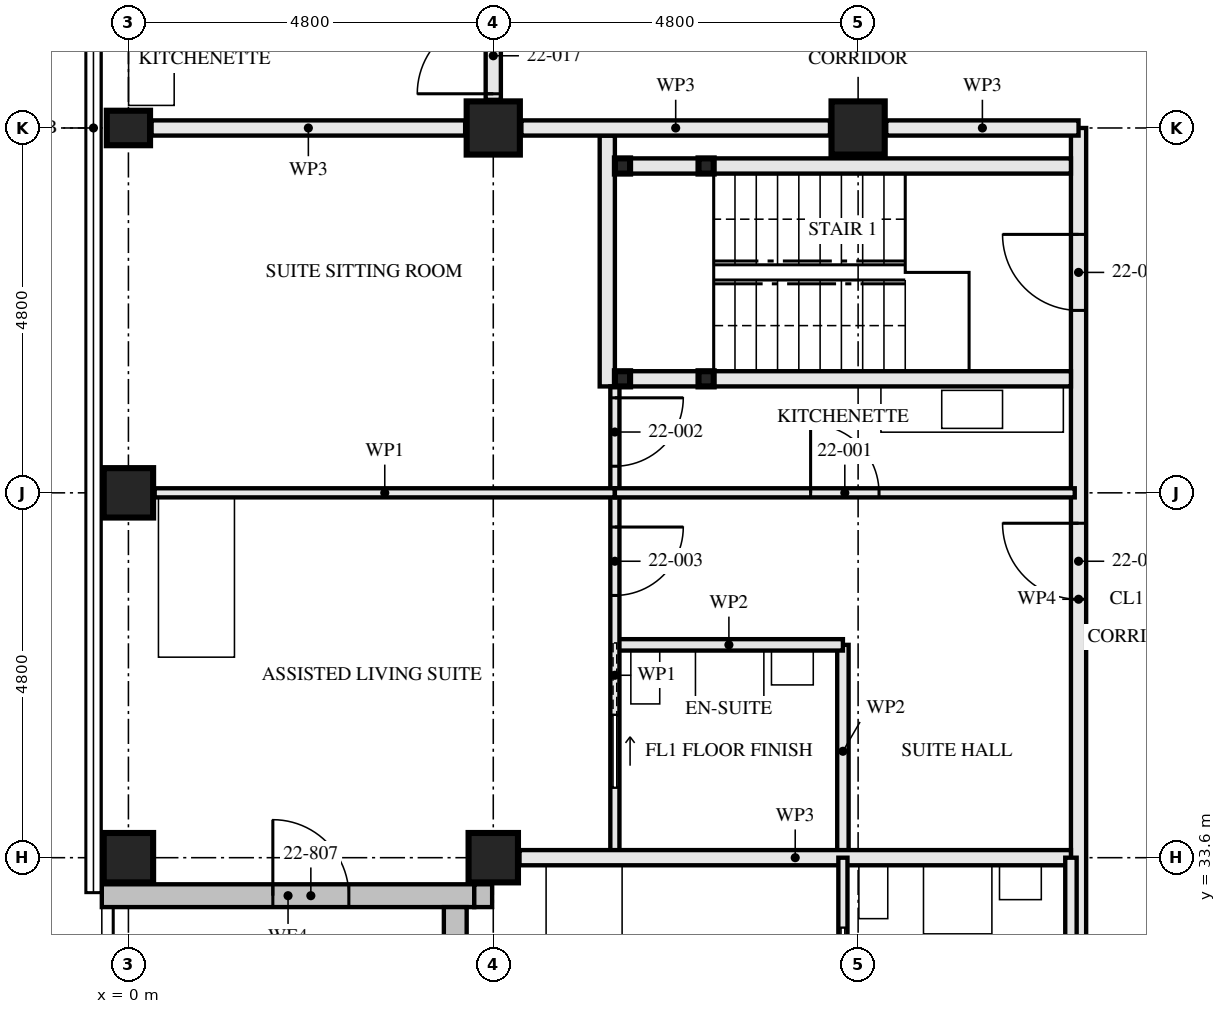
"""IFC4 building model, lengths in metres.
Left out: names, types, materials, properties, quantities, classifications, styles, units other than length and angle.
Written with IfcOpenShell. Run it as: python <this file> out.ifc"""

import sys

from ifc_helpers import new_model, si_unit, direction, frame, frame_2d, origin, origin_2d, place, context, subcontext, project, spatial, rectangle, hollow_rectangle, i_section, extrude, element, fill, save


model = new_model("IFC4")
c1 = context("Model", 3, precision=1e-05, world=origin(), true_north=direction((0.0, 1.0)))
c2 = subcontext(c1, "Body", "Model", "MODEL_VIEW")
j1 = project(units=[si_unit("LENGTHUNIT", "METRE"), si_unit("PLANEANGLEUNIT", "RADIAN")], contexts=[c1])
p1 = place(None, origin())
s1 = spatial("IfcSite", under=j1, at=p1, CompositionType="ELEMENT")
p2 = place(p1, origin())
s2 = spatial("IfcBuilding", under=s1, at=p2, CompositionType="ELEMENT")
p3 = place(p2, frame((0.0, 0.0, 84.0)))
s3 = spatial("IfcBuildingStorey", under=s2, at=p3, CompositionType="ELEMENT", Elevation=84.0)
for number, where, z_axis, x_axis in (
    (1, (0.0, 33.6, 0.0), (0.0, 0.0, 1.0), (0.0, 1.0, 0.0)),
    (2, (0.0, 38.4, 0.0), (0.0, 0.0, 1.0), (1.0, 0.0, 0.0)),
):
    element("IfcColumn", number, at=place(p3, frame(where, z_axis=z_axis, x_axis=x_axis)), inside=s3, PredefinedType="COLUMN", context=c2, shape_type="SweptSolid", body=[
        extrude(hollow_rectangle(XDim=0.65, YDim=0.65, WallThickness=0.08, at=origin_2d()), origin(), (0.0, 0.0, 1.0), 3.5),
    ])
p4 = place(p3, frame((0.0, 43.2, 0.0), z_axis=(0.0, 0.0, 1.0), x_axis=(0.0, 1.0, 0.0)))
e3 = element("IfcColumn", 3, at=p4, inside=s3, PredefinedType="COLUMN", context=c2, shape_type="SweptSolid", body=[
    extrude(i_section(OverallWidth=0.454, OverallDepth=0.569, WebThickness=0.078, FlangeThickness=0.125, FilletRadius=0.015, at=origin_2d()), origin(), (0.0, 0.0, 1.0), 3.5),
])
p5 = place(p3, frame((4.8, 33.6, 0.0), z_axis=(0.0, 0.0, 1.0), x_axis=(0.0, 1.0, 0.0)))
e4 = element("IfcColumn", 4, at=p5, inside=s3, PredefinedType="COLUMN", context=c2, shape_type="SweptSolid", body=[
    extrude(hollow_rectangle(XDim=0.65, YDim=0.65, WallThickness=0.08, at=origin_2d()), origin(), (0.0, 0.0, 1.0), 3.5),
])
for number, where, z_axis, x_axis in (
    (5, (4.8, 43.2, 0.0), (0.0, 0.0, 1.0), (0.0, 1.0, 0.0)),
    (6, (9.6, 43.2, 0.0), (0.0, 0.0, 1.0), (0.0, 1.0, 0.0)),
):
    element("IfcColumn", number, at=place(p3, frame(where, z_axis=z_axis, x_axis=x_axis)), inside=s3, PredefinedType="COLUMN", context=c2, shape_type="SweptSolid", body=[
        extrude(hollow_rectangle(XDim=0.7, YDim=0.7, WallThickness=0.06, at=origin_2d()), origin(), (0.0, 0.0, 1.0), 3.5),
    ])
for number, where, z_axis, x_axis in (
    (7, (6.5, 42.7, 0.0), (0.0, 0.0, 1.0), (1.0, 0.0, 0.0)),
    (8, (6.5, 39.9, 0.0), (0.0, 0.0, 1.0), (1.0, 0.0, 0.0)),
    (9, (7.6, 42.7, 0.0), (0.0, 0.0, 1.0), (1.0, 0.0, 0.0)),
    (10, (7.6, 39.9, 0.0), (0.0, 0.0, 1.0), (1.0, 0.0, 0.0)),
):
    element("IfcColumn", number, at=place(p3, frame(where, z_axis=z_axis, x_axis=x_axis)), inside=s3, PredefinedType="COLUMN", context=c2, shape_type="SweptSolid", body=[
        extrude(hollow_rectangle(XDim=0.2, YDim=0.2, WallThickness=0.008, at=origin_2d()), origin(), (0.0, 0.0, 1.0), 3.33),
    ])
p6 = place(p3, frame((-0.35, 33.1, 0.0), z_axis=(0.0, 0.0, 1.0), x_axis=(1.0, 0.0, 0.0)))
e11 = element("IfcWall", 11, at=p6, inside=s3, PredefinedType="SOLIDWALL", context=c2, shape_type="SweptSolid", body=[
    extrude(rectangle(XDim=4.9, YDim=0.3, at=frame_2d((2.45, 0.0))), origin(), (0.0, 0.0, 1.0), 3.5),
])
p7 = place(p6, frame((2.25, 0.0, 0.0)))
e12 = element("IfcOpeningElement", 12, at=p7, cuts=e11, PredefinedType="OPENING", context=c2, shape_type="SweptSolid", body=[
    extrude(rectangle(XDim=1.0, YDim=2.4, at=frame_2d((0.5, 1.2))), frame((0.0, 0.161, 0.0), z_axis=(0.0, -1.0, 0.0), x_axis=(1.0, 0.0, 0.0)), (0.0, 0.0, 1.0), 0.321),
])
p8 = place(p3, frame((4.3, 32.95, 0.0), z_axis=(0.0, 0.0, 1.0), x_axis=(0.0, -1.0, 0.0)))
e13 = element("IfcWall", 13, at=p8, inside=s3, PredefinedType="SOLIDWALL", context=c2, shape_type="SweptSolid", body=[
    extrude(rectangle(XDim=4.8, YDim=0.3, at=frame_2d((2.4, 0.0))), origin(), (0.0, 0.0, 1.0), 3.5),
])
p9 = place(p8, frame((1.25, 0.0, 0.0)))
e14 = element("IfcOpeningElement", 14, at=p9, cuts=e13, PredefinedType="OPENING", context=c2, shape_type="SweptSolid", body=[
    extrude(rectangle(XDim=1.0, YDim=2.4, at=frame_2d((0.5, 1.2))), frame((0.0, 0.161, 0.0), z_axis=(0.0, -1.0, 0.0), x_axis=(1.0, 0.0, 0.0)), (0.0, 0.0, 1.0), 0.321),
])
p10 = place(p3, frame((4.55, 33.1, 2.39), z_axis=(0.0, 0.0, 1.0), x_axis=(1.0, 0.0, 0.0)))
e15 = element("IfcWall", 15, at=p10, inside=s3, PredefinedType="SOLIDWALL", context=c2, shape_type="SweptSolid", body=[
    extrude(rectangle(XDim=0.235, YDim=0.3, at=frame_2d((0.117, 0.0))), origin(), (0.0, 0.0, 1.0), 0.88),
])
p11 = place(p3, frame((6.6, 42.7, 0.0), z_axis=(0.0, 0.0, 1.0), x_axis=(1.0, 0.0, 0.0)))
e16 = element("IfcWall", 16, at=p11, inside=s3, PredefinedType="SOLIDWALL", context=c2, shape_type="SweptSolid", body=[
    extrude(rectangle(XDim=0.9, YDim=0.2, at=frame_2d((0.45, 0.0))), origin(), (0.0, 0.0, 1.0), 2.99),
])
p12 = place(p3, frame((7.7, 42.7, 0.0), z_axis=(0.0, 0.0, 1.0), x_axis=(1.0, 0.0, 0.0)))
e17 = element("IfcWall", 17, at=p12, inside=s3, PredefinedType="SOLIDWALL", context=c2, shape_type="SweptSolid", body=[
    extrude(rectangle(XDim=4.7, YDim=0.2, at=frame_2d((2.35, 0.0))), origin(), (0.0, 0.0, 1.0), 2.99),
])
p13 = place(p3, frame((6.6, 39.9, 0.0), z_axis=(0.0, 0.0, 1.0), x_axis=(1.0, 0.0, 0.0)))
e18 = element("IfcWall", 18, at=p13, inside=s3, PredefinedType="SOLIDWALL", context=c2, shape_type="SweptSolid", body=[
    extrude(rectangle(XDim=0.9, YDim=0.2, at=frame_2d((0.45, 0.0))), origin(), (0.0, 0.0, 1.0), 2.99),
])
p14 = place(p3, frame((7.7, 39.9, 0.0), z_axis=(0.0, 0.0, 1.0), x_axis=(1.0, 0.0, 0.0)))
e19 = element("IfcWall", 19, at=p14, inside=s3, PredefinedType="SOLIDWALL", context=c2, shape_type="SweptSolid", body=[
    extrude(rectangle(XDim=4.7, YDim=0.2, at=frame_2d((2.35, 0.0))), origin(), (0.0, 0.0, 1.0), 2.99),
])
p15 = place(p3, frame((6.3, 43.1, 0.0), z_axis=(0.0, 0.0, 1.0), x_axis=(0.0, -1.0, 0.0)))
e20 = element("IfcWall", 20, at=p15, inside=s3, PredefinedType="SOLIDWALL", context=c2, shape_type="SweptSolid", body=[
    extrude(rectangle(XDim=3.3, YDim=0.2, at=frame_2d((1.65, 0.0))), origin(), (0.0, 0.0, 1.0), 3.33),
])
p16 = place(p3, frame((6.4, 36.4, 0.0), z_axis=(0.0, 0.0, 1.0), x_axis=(1.0, 0.0, 0.0)))
e21 = element("IfcWall", 21, at=p16, inside=s3, PredefinedType="PARTITIONING", context=c2, shape_type="SweptSolid", body=[
    extrude(rectangle(XDim=3.0, YDim=0.15, at=frame_2d((1.5, 0.0))), origin(), (0.0, 0.0, 1.0), 3.33),
])
p17 = place(p3, frame((9.4, 36.4, 0.0), z_axis=(0.0, 0.0, 1.0), x_axis=(0.0, -1.0, 0.0)))
e22 = element("IfcWall", 22, at=p17, inside=s3, PredefinedType="PARTITIONING", context=c2, shape_type="SweptSolid", body=[
    extrude(rectangle(XDim=2.8, YDim=0.15, at=frame_2d((1.4, 0.0))), origin(), (0.0, 0.0, 1.0), 3.33),
])
p18 = place(p3, frame((6.4, 38.4, 0.0), z_axis=(0.0, 0.0, 1.0), x_axis=(1.0, 0.0, 0.0)))
e23 = element("IfcWall", 23, at=p18, inside=s3, PredefinedType="PARTITIONING", context=c2, shape_type="SweptSolid", body=[
    extrude(rectangle(XDim=6.05, YDim=0.12, at=frame_2d((3.025, 0.0))), origin(), (0.0, 0.0, 1.0), 2.55),
])
p19 = place(p18, frame((2.575, 0.0, 0.0)))
e24 = element("IfcOpeningElement", 24, at=p19, cuts=e23, PredefinedType="OPENING", context=c2, shape_type="SweptSolid", body=[
    extrude(rectangle(XDim=0.9, YDim=2.1, at=frame_2d((0.45, 1.05))), frame((0.0, 0.071, 0.0), z_axis=(0.0, -1.0, 0.0), x_axis=(1.0, 0.0, 0.0)), (0.0, 0.0, 1.0), 0.141),
])
p20 = place(p3, frame((6.4, 39.8, 0.0), z_axis=(0.0, 0.0, 1.0), x_axis=(0.0, -1.0, 0.0)))
e25 = element("IfcWall", 25, at=p20, inside=s3, PredefinedType="PARTITIONING", context=c2, shape_type="SweptSolid", body=[
    extrude(rectangle(XDim=1.4, YDim=0.12, at=frame_2d((0.7, 0.0))), origin(), (0.0, 0.0, 1.0), 3.33),
])
p21 = place(p20, frame((0.15, 0.0, 0.0)))
e26 = element("IfcOpeningElement", 26, at=p21, cuts=e25, PredefinedType="OPENING", context=c2, shape_type="SweptSolid", body=[
    extrude(rectangle(XDim=0.9, YDim=2.1, at=frame_2d((0.45, 1.05))), frame((0.0, 0.071, 0.0), z_axis=(0.0, -1.0, 0.0), x_axis=(1.0, 0.0, 0.0)), (0.0, 0.0, 1.0), 0.141),
])
p22 = place(p3, frame((6.4, 38.4, 0.0), z_axis=(0.0, 0.0, 1.0), x_axis=(0.0, -1.0, 0.0)))
e27 = element("IfcWall", 27, at=p22, inside=s3, PredefinedType="PARTITIONING", context=c2, shape_type="SweptSolid", body=[
    extrude(rectangle(XDim=4.8, YDim=0.12, at=frame_2d((2.4, 0.0))), origin(), (0.0, 0.0, 1.0), 3.33),
])
p23 = place(p22, frame((0.45, 0.0, 0.0)))
e28 = element("IfcOpeningElement", 28, at=p23, cuts=e27, PredefinedType="OPENING", context=c2, shape_type="SweptSolid", body=[
    extrude(rectangle(XDim=0.9, YDim=2.1, at=frame_2d((0.45, 1.05))), frame((0.0, 0.071, 0.0), z_axis=(0.0, -1.0, 0.0), x_axis=(1.0, 0.0, 0.0)), (0.0, 0.0, 1.0), 0.141),
])
p24 = place(p22, frame((2.925, 0.0, 0.0)))
e29 = element("IfcOpeningElement", 29, at=p24, cuts=e27, PredefinedType="OPENING", context=c2, shape_type="SweptSolid", body=[
    extrude(rectangle(XDim=0.95, YDim=2.1, at=frame_2d((0.475, 1.05))), frame((0.0, 0.071, 0.0), z_axis=(0.0, -1.0, 0.0), x_axis=(1.0, 0.0, 0.0)), (0.0, 0.0, 1.0), 0.141),
])
p25 = place(p3, frame((0.345, 38.4, 0.0), z_axis=(0.0, 0.0, 1.0), x_axis=(1.0, 0.0, 0.0)))
e30 = element("IfcWall", 30, at=p25, inside=s3, PredefinedType="PARTITIONING", context=c2, shape_type="SweptSolid", body=[
    extrude(rectangle(XDim=6.055, YDim=0.12, at=frame_2d((3.027, 0.0))), origin(), (0.0, 0.0, 1.0), 2.55),
])
p26 = place(p3, frame((5.145, 33.6, 0.0), z_axis=(0.0, 0.0, 1.0), x_axis=(1.0, 0.0, 0.0)))
e31 = element("IfcWall", 31, at=p26, inside=s3, PredefinedType="PARTITIONING", context=c2, shape_type="SweptSolid", body=[
    extrude(rectangle(XDim=7.255, YDim=0.2, at=frame_2d((3.627, 0.0))), origin(), (0.0, 0.0, 1.0), 2.55),
])
p27 = place(p3, frame((12.4, 33.6, 0.0), z_axis=(0.0, 0.0, 1.0), x_axis=(0.0, -1.0, 0.0)))
e32 = element("IfcWall", 32, at=p27, inside=s3, PredefinedType="PARTITIONING", context=c2, shape_type="SweptSolid", body=[
    extrude(rectangle(XDim=2.8, YDim=0.15, at=frame_2d((1.4, 0.0))), origin(), (0.0, 0.0, 1.0), 3.33),
])
p28 = place(p3, frame((9.4, 33.6, 0.0), z_axis=(0.0, 0.0, 1.0), x_axis=(0.0, -1.0, 0.0)))
e33 = element("IfcWall", 33, at=p28, inside=s3, PredefinedType="PARTITIONING", context=c2, shape_type="SweptSolid", body=[
    extrude(rectangle(XDim=4.48, YDim=0.12, at=frame_2d((2.24, 0.0))), origin(), (0.0, 0.0, 1.0), 3.33),
])
p29 = place(p28, frame((2.975, 0.0, 0.0)))
e34 = element("IfcOpeningElement", 34, at=p29, cuts=e33, PredefinedType="OPENING", context=c2, shape_type="SweptSolid", body=[
    extrude(rectangle(XDim=0.9, YDim=2.1, at=frame_2d((0.45, 1.05))), frame((0.0, 0.071, 0.0), z_axis=(0.0, -1.0, 0.0), x_axis=(1.0, 0.0, 0.0)), (0.0, 0.0, 1.0), 0.141),
])
p30 = place(p28, frame((0.925, 0.0, 0.0)))
e35 = element("IfcOpeningElement", 35, at=p30, cuts=e33, PredefinedType="OPENING", context=c2, shape_type="SweptSolid", body=[
    extrude(rectangle(XDim=0.95, YDim=2.1, at=frame_2d((0.475, 1.05))), frame((0.0, 0.071, 0.0), z_axis=(0.0, -1.0, 0.0), x_axis=(1.0, 0.0, 0.0)), (0.0, 0.0, 1.0), 0.141),
])
p31 = place(p3, frame((12.5, 43.2, 0.0), z_axis=(0.0, 0.0, 1.0), x_axis=(0.0, -1.0, 0.0)))
e36 = element("IfcWall", 36, at=p31, inside=s3, PredefinedType="PARTITIONING", context=c2, shape_type="SweptSolid", body=[
    extrude(rectangle(XDim=12.4, YDim=0.2, at=frame_2d((6.2, 0.0))), origin(), (0.0, 0.0, 1.0), 2.55),
])
p32 = place(p31, frame((1.4, 0.0, 0.0)))
e37 = element("IfcOpeningElement", 37, at=p32, cuts=e36, PredefinedType="OPENING", context=c2, shape_type="SweptSolid", body=[
    extrude(rectangle(XDim=1.0, YDim=2.1, at=frame_2d((0.5, 1.05))), frame((0.0, 0.111, 0.0), z_axis=(0.0, -1.0, 0.0), x_axis=(1.0, 0.0, 0.0)), (0.0, 0.0, 1.0), 0.221),
])
p33 = place(p31, frame((5.2, 0.0, 0.0)))
e38 = element("IfcOpeningElement", 38, at=p33, cuts=e36, PredefinedType="OPENING", context=c2, shape_type="SweptSolid", body=[
    extrude(rectangle(XDim=1.0, YDim=2.1, at=frame_2d((0.5, 1.05))), frame((0.0, 0.111, 0.0), z_axis=(0.0, -1.0, 0.0), x_axis=(1.0, 0.0, 0.0)), (0.0, 0.0, 1.0), 0.221),
])
p34 = place(p3, frame((4.8, 45.2, 0.0), z_axis=(0.0, 0.0, 1.0), x_axis=(0.0, -1.0, 0.0)))
e39 = element("IfcWall", 39, at=p34, inside=s3, PredefinedType="PARTITIONING", context=c2, shape_type="SweptSolid", body=[
    extrude(rectangle(XDim=1.63, YDim=0.2, at=frame_2d((0.815, 0.0))), origin(), (0.0, 0.0, 1.0), 3.33),
])
p35 = place(p34, frame((0.55, 0.0, 0.0)))
e40 = element("IfcOpeningElement", 40, at=p35, cuts=e39, PredefinedType="OPENING", context=c2, shape_type="SweptSolid", body=[
    extrude(rectangle(XDim=1.0, YDim=2.1, at=frame_2d((0.5, 1.05))), frame((0.0, 0.111, 0.0), z_axis=(0.0, -1.0, 0.0), x_axis=(1.0, 0.0, 0.0)), (0.0, 0.0, 1.0), 0.221),
])
p36 = place(p3, frame((12.5, 43.2, 0.0), z_axis=(0.0, 0.0, 1.0), x_axis=(-1.0, 0.0, 0.0)))
e41 = element("IfcWall", 41, at=p36, inside=s3, PredefinedType="PARTITIONING", context=c2, shape_type="SweptSolid", body=[
    extrude(rectangle(XDim=2.53, YDim=0.2, at=frame_2d((1.265, 0.0))), origin(), (0.0, 0.0, 1.0), 2.32),
])
p37 = place(p3, frame((9.23, 43.2, 0.0), z_axis=(0.0, 0.0, 1.0), x_axis=(-1.0, 0.0, 0.0)))
e42 = element("IfcWall", 42, at=p37, inside=s3, PredefinedType="PARTITIONING", context=c2, shape_type="SweptSolid", body=[
    extrude(rectangle(XDim=4.06, YDim=0.2, at=frame_2d((2.03, 0.0))), origin(), (0.0, 0.0, 1.0), 2.32),
])
p38 = place(p3, frame((4.43, 43.2, 0.0), z_axis=(0.0, 0.0, 1.0), x_axis=(-1.0, 0.0, 0.0)))
e43 = element("IfcWall", 43, at=p38, inside=s3, PredefinedType="PARTITIONING", context=c2, shape_type="SweptSolid", body=[
    extrude(rectangle(XDim=4.125, YDim=0.2, at=frame_2d((2.063, 0.0))), origin(), (0.0, 0.0, 1.0), 2.32),
])
p39 = place(p7, origin())
e44 = element("IfcDoor", 44, at=p39, inside=s3, OperationType="SINGLE_SWING_LEFT", PredefinedType="DOOR", context=c2, shape_type="SweptSolid", body=[
    extrude(rectangle(XDim=1.0, YDim=2.4, at=frame_2d((0.5, 1.2))), frame((0.0, 0.035, 0.0), z_axis=(0.0, -1.0, 0.0), x_axis=(1.0, 0.0, 0.0)), (0.0, 0.0, 1.0), 0.07),
])
fill(e12, e44)
p40 = place(p19, origin())
e45 = element("IfcDoor", 45, at=p40, inside=s3, OperationType="SINGLE_SWING_RIGHT", PredefinedType="DOOR", context=c2, shape_type="SweptSolid", body=[
    extrude(rectangle(XDim=0.9, YDim=2.1, at=frame_2d((0.45, 1.05))), frame((0.0, 0.022, 0.0), z_axis=(0.0, -1.0, 0.0), x_axis=(1.0, 0.0, 0.0)), (0.0, 0.0, 1.0), 0.044),
])
fill(e24, e45)
p41 = place(p21, origin())
e46 = element("IfcDoor", 46, at=p41, inside=s3, OperationType="SINGLE_SWING_RIGHT", PredefinedType="DOOR", context=c2, shape_type="SweptSolid", body=[
    extrude(rectangle(XDim=0.9, YDim=2.1, at=frame_2d((0.45, 1.05))), frame((0.0, 0.022, 0.0), z_axis=(0.0, -1.0, 0.0), x_axis=(1.0, 0.0, 0.0)), (0.0, 0.0, 1.0), 0.044),
])
fill(e26, e46)
p42 = place(p23, origin())
e47 = element("IfcDoor", 47, at=p42, inside=s3, OperationType="SINGLE_SWING_RIGHT", PredefinedType="DOOR", context=c2, shape_type="SweptSolid", body=[
    extrude(rectangle(XDim=0.9, YDim=2.1, at=frame_2d((0.45, 1.05))), frame((0.0, 0.022, 0.0), z_axis=(0.0, -1.0, 0.0), x_axis=(1.0, 0.0, 0.0)), (0.0, 0.0, 1.0), 0.044),
])
fill(e28, e47)
p43 = place(p24, origin())
e48 = element("IfcDoor", 48, at=p43, inside=s3, OperationType="SLIDING_TO_RIGHT", PredefinedType="DOOR", context=c2, shape_type="SweptSolid", body=[
    extrude(rectangle(XDim=0.95, YDim=2.1, at=frame_2d((0.475, 1.05))), frame((0.0, 0.022, 0.0), z_axis=(0.0, -1.0, 0.0), x_axis=(1.0, 0.0, 0.0)), (0.0, 0.0, 1.0), 0.044),
])
fill(e29, e48)
p44 = place(p30, origin())
e49 = element("IfcDoor", 49, at=p44, inside=s3, OperationType="SLIDING_TO_LEFT", PredefinedType="DOOR", context=c2, shape_type="SweptSolid", body=[
    extrude(rectangle(XDim=0.95, YDim=2.1, at=frame_2d((0.475, 1.05))), frame((0.0, 0.022, 0.0), z_axis=(0.0, -1.0, 0.0), x_axis=(1.0, 0.0, 0.0)), (0.0, 0.0, 1.0), 0.044),
])
fill(e35, e49)
p45 = place(p32, frame((1.0, 0.0, 0.0), z_axis=(0.0, 0.0, 1.0), x_axis=(-1.0, 0.0, 0.0)))
e50 = element("IfcDoor", 50, at=p45, inside=s3, OperationType="SINGLE_SWING_LEFT", PredefinedType="DOOR", context=c2, shape_type="SweptSolid", body=[
    extrude(rectangle(XDim=1.0, YDim=2.1, at=frame_2d((0.5, 1.05))), frame((0.0, 0.032, 0.0), z_axis=(0.0, -1.0, 0.0), x_axis=(1.0, 0.0, 0.0)), (0.0, 0.0, 1.0), 0.064),
])
fill(e37, e50)
p46 = place(p33, frame((1.0, 0.0, 0.0), z_axis=(0.0, 0.0, 1.0), x_axis=(-1.0, 0.0, 0.0)))
e51 = element("IfcDoor", 51, at=p46, inside=s3, OperationType="SINGLE_SWING_LEFT", PredefinedType="DOOR", context=c2, shape_type="SweptSolid", body=[
    extrude(rectangle(XDim=1.0, YDim=2.1, at=frame_2d((0.5, 1.05))), frame((0.0, 0.027, 0.0), z_axis=(0.0, -1.0, 0.0), x_axis=(1.0, 0.0, 0.0)), (0.0, 0.0, 1.0), 0.054),
])
fill(e38, e51)
p47 = place(p35, frame((1.0, 0.0, 0.0), z_axis=(0.0, 0.0, 1.0), x_axis=(-1.0, 0.0, 0.0)))
e52 = element("IfcDoor", 52, at=p47, inside=s3, OperationType="SINGLE_SWING_RIGHT", PredefinedType="DOOR", context=c2, shape_type="SweptSolid", body=[
    extrude(rectangle(XDim=1.0, YDim=2.1, at=frame_2d((0.5, 1.05))), frame((0.0, 0.027, 0.0), z_axis=(0.0, -1.0, 0.0), x_axis=(1.0, 0.0, 0.0)), (0.0, 0.0, 1.0), 0.054),
])
fill(e40, e52)
save(model, sys.argv[1])
